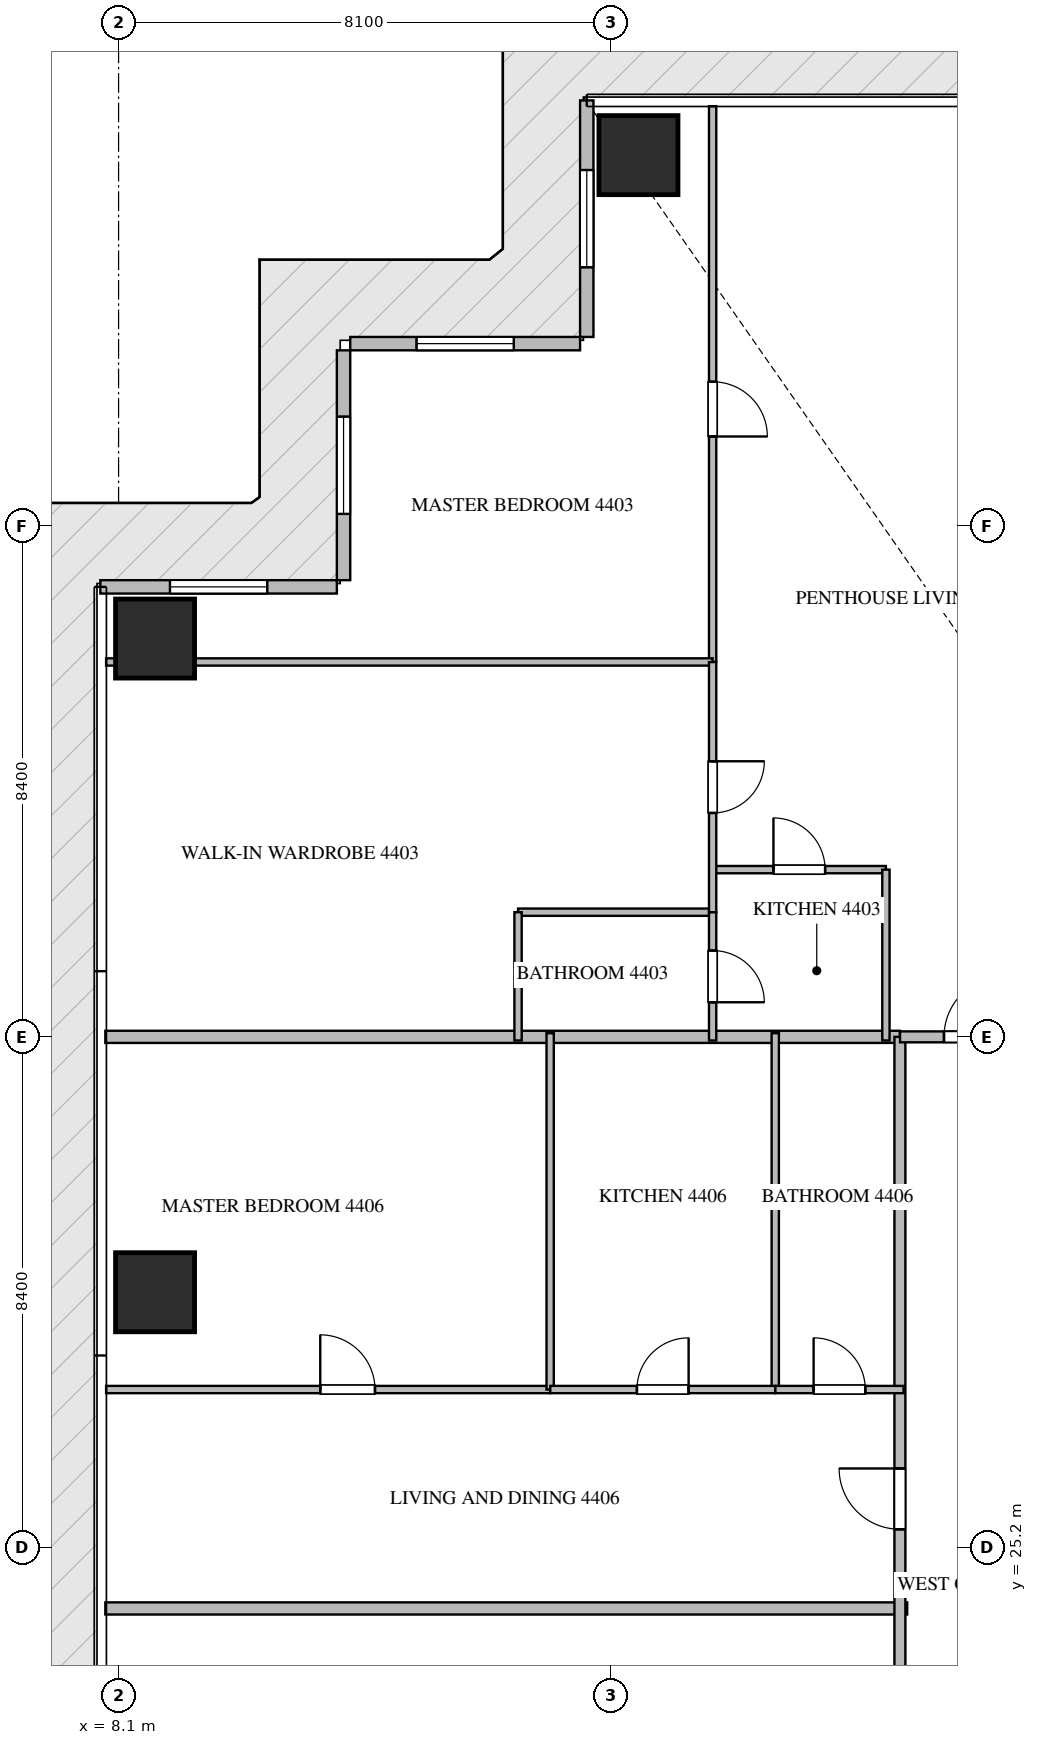
"""IFC4 building model, lengths in metres.
Left out: names, types, materials, properties, quantities, classifications, styles, units other than length and angle.
Written with IfcOpenShell. Run it as: python <this file> out.ifc"""

import sys

from ifc_helpers import new_model, si_unit, direction, frame, frame_2d, origin, origin_2d, place, context, subcontext, project, spatial, rectangle, extrude, source, transform, mapped, element, fill, save


model = new_model("IFC4")
c1 = context("Model", 3, precision=1e-05, world=origin(), true_north=direction((0.0, 1.0)))
c2 = subcontext(c1, "Body", "Model", "MODEL_VIEW")
j1 = project(units=[si_unit("LENGTHUNIT", "METRE"), si_unit("PLANEANGLEUNIT", "RADIAN")], contexts=[c1])
p1 = place(None, origin())
s1 = spatial("IfcSite", under=j1, at=p1, CompositionType="ELEMENT")
p2 = place(p1, origin())
s2 = spatial("IfcBuilding", under=s1, at=p2, CompositionType="ELEMENT")
p3 = place(p2, frame((0.0, 0.0, 176.4)))
s3 = spatial("IfcBuildingStorey", under=s2, at=p3, CompositionType="ELEMENT", Elevation=176.4)
m1 = source(origin(), c2, "Body", "SweptSolid", [
    extrude(rectangle(XDim=1.3, YDim=1.3, at=origin_2d()), origin(), (0.0, 0.0, 1.0), 3.75),
])
for number, where, z_axis, x_axis in (
    (1, (16.65, 48.1, -0.26), (0.0, 0.0, 1.0), (1.0, 0.0, 0.0)),
    (2, (8.7, 29.4, -0.26), (0.0, 0.0, 1.0), (1.0, 0.0, 0.0)),
    (3, (8.7, 40.15, -0.26), (0.0, 0.0, 1.0), (1.0, 0.0, 0.0)),
):
    element("IfcColumn", number, at=place(p3, frame(where, z_axis=z_axis, x_axis=x_axis)), inside=s3, PredefinedType="COLUMN", context=c2, shape_type="MappedRepresentation", body=[
        mapped(m1, transform((0.0, 0.0, 0.0), scale=1.0)),
    ])
p4 = place(p3, frame((15.8, 49.0, 0.0), z_axis=(0.0, 0.0, 1.0), x_axis=(0.0, -1.0, 0.0)))
e4 = element("IfcWall", 4, at=p4, inside=s3, PredefinedType="ELEMENTEDWALL", context=c2, shape_type="SweptSolid", body=[
    extrude(rectangle(XDim=3.89, YDim=0.22, at=frame_2d((1.945, 0.0))), origin(), (0.0, 0.0, 1.0), 3.475),
])
p5 = place(p4, frame((1.145, 0.0, 0.65)))
e5 = element("IfcOpeningElement", 5, at=p5, cuts=e4, PredefinedType="OPENING", context=c2, shape_type="SweptSolid", body=[
    extrude(rectangle(XDim=1.6, YDim=2.1, at=frame_2d((0.8, 1.05))), frame((0.0, 0.12, 0.0), z_axis=(0.0, -1.0, 0.0), x_axis=(1.0, 0.0, 0.0)), (0.0, 0.0, 1.0), 0.24),
])
p6 = place(p3, frame((15.69, 45.0, 0.0), z_axis=(0.0, 0.0, 1.0), x_axis=(-1.0, 0.0, 0.0)))
e6 = element("IfcWall", 6, at=p6, inside=s3, PredefinedType="ELEMENTEDWALL", context=c2, shape_type="SweptSolid", body=[
    extrude(rectangle(XDim=3.78, YDim=0.22, at=frame_2d((1.89, 0.0))), origin(), (0.0, 0.0, 1.0), 3.475),
])
p7 = place(p6, frame((1.09, 0.0, 0.65)))
e7 = element("IfcOpeningElement", 7, at=p7, cuts=e6, PredefinedType="OPENING", context=c2, shape_type="SweptSolid", body=[
    extrude(rectangle(XDim=1.6, YDim=2.1, at=frame_2d((0.8, 1.05))), frame((0.0, 0.12, 0.0), z_axis=(0.0, -1.0, 0.0), x_axis=(1.0, 0.0, 0.0)), (0.0, 0.0, 1.0), 0.24),
])
p8 = place(p3, frame((11.8, 44.89, 0.0), z_axis=(0.0, 0.0, 1.0), x_axis=(0.0, -1.0, 0.0)))
e8 = element("IfcWall", 8, at=p8, inside=s3, PredefinedType="ELEMENTEDWALL", context=c2, shape_type="SweptSolid", body=[
    extrude(rectangle(XDim=3.78, YDim=0.22, at=frame_2d((1.89, 0.0))), origin(), (0.0, 0.0, 1.0), 3.475),
])
p9 = place(p8, frame((1.09, 0.0, 0.65)))
e9 = element("IfcOpeningElement", 9, at=p9, cuts=e8, PredefinedType="OPENING", context=c2, shape_type="SweptSolid", body=[
    extrude(rectangle(XDim=1.6, YDim=2.1, at=frame_2d((0.8, 1.05))), frame((0.0, 0.12, 0.0), z_axis=(0.0, -1.0, 0.0), x_axis=(1.0, 0.0, 0.0)), (0.0, 0.0, 1.0), 0.24),
])
p10 = place(p3, frame((11.69, 41.0, 0.0), z_axis=(0.0, 0.0, 1.0), x_axis=(-1.0, 0.0, 0.0)))
e10 = element("IfcWall", 10, at=p10, inside=s3, PredefinedType="ELEMENTEDWALL", context=c2, shape_type="SweptSolid", body=[
    extrude(rectangle(XDim=3.89, YDim=0.22, at=frame_2d((1.945, 0.0))), origin(), (0.0, 0.0, 1.0), 3.475),
])
p11 = place(p10, frame((1.145, 0.0, 0.65)))
e11 = element("IfcOpeningElement", 11, at=p11, cuts=e10, PredefinedType="OPENING", context=c2, shape_type="SweptSolid", body=[
    extrude(rectangle(XDim=1.6, YDim=2.1, at=frame_2d((0.8, 1.05))), frame((0.0, 0.12, 0.0), z_axis=(0.0, -1.0, 0.0), x_axis=(1.0, 0.0, 0.0)), (0.0, 0.0, 1.0), 0.24),
])
p12 = place(p3, frame((7.882, 24.2, 0.0), z_axis=(0.0, 0.0, 1.0), x_axis=(1.0, 0.0, 0.0)))
e12 = element("IfcWall", 12, at=p12, inside=s3, PredefinedType="PARTITIONING", context=c2, shape_type="SweptSolid", body=[
    extrude(rectangle(XDim=13.188, YDim=0.2, at=frame_2d((6.594, 0.0))), origin(), (0.0, 0.0, 1.0), 3.49),
])
p13 = place(p3, frame((7.882, 33.6, 0.0), z_axis=(0.0, 0.0, 1.0), x_axis=(1.0, 0.0, 0.0)))
e13 = element("IfcWall", 13, at=p13, inside=s3, PredefinedType="PARTITIONING", context=c2, shape_type="SweptSolid", body=[
    extrude(rectangle(XDim=13.068, YDim=0.2, at=frame_2d((6.534, 0.0))), origin(), (0.0, 0.0, 1.0), 3.49),
])
p14 = place(p3, frame((20.95, 14.9, 0.0), z_axis=(0.0, 0.0, 1.0), x_axis=(0.0, 1.0, 0.0)))
e14 = element("IfcWall", 14, at=p14, inside=s3, PredefinedType="PARTITIONING", context=c2, shape_type="SweptSolid", body=[
    extrude(rectangle(XDim=18.7, YDim=0.18, at=frame_2d((9.35, 0.0))), origin(), (0.0, 0.0, 1.0), 3.49),
])
p15 = place(p14, frame((5.522, 0.0, 0.0)))
e15 = element("IfcOpeningElement", 15, at=p15, cuts=e14, PredefinedType="OPENING", context=c2, shape_type="SweptSolid", body=[
    extrude(rectangle(XDim=1.0, YDim=2.15, at=frame_2d((0.5, 1.075))), frame((0.0, 0.1, 0.0), z_axis=(0.0, -1.0, 0.0), x_axis=(1.0, 0.0, 0.0)), (0.0, 0.0, 1.0), 0.2),
])
p16 = place(p14, frame((10.602, 0.0, 0.0)))
e16 = element("IfcOpeningElement", 16, at=p16, cuts=e14, PredefinedType="OPENING", context=c2, shape_type="SweptSolid", body=[
    extrude(rectangle(XDim=1.0, YDim=2.15, at=frame_2d((0.5, 1.075))), frame((0.0, 0.1, 0.0), z_axis=(0.0, -1.0, 0.0), x_axis=(1.0, 0.0, 0.0)), (0.0, 0.0, 1.0), 0.2),
])
p17 = place(p3, frame((20.952, 33.6, 0.0), z_axis=(0.0, 0.0, 1.0), x_axis=(1.0, 0.0, 0.0)))
e17 = element("IfcWall", 17, at=p17, inside=s3, PredefinedType="PARTITIONING", context=c2, shape_type="SweptSolid", body=[
    extrude(rectangle(XDim=2.446, YDim=0.18, at=frame_2d((1.223, 0.0))), origin(), (0.0, 0.0, 1.0), 3.49),
])
p18 = place(p17, frame((0.723, 0.0, 0.0)))
e18 = element("IfcOpeningElement", 18, at=p18, cuts=e17, PredefinedType="OPENING", context=c2, shape_type="SweptSolid", body=[
    extrude(rectangle(XDim=1.0, YDim=2.15, at=frame_2d((0.5, 1.075))), frame((0.0, 0.1, 0.0), z_axis=(0.0, -1.0, 0.0), x_axis=(1.0, 0.0, 0.0)), (0.0, 0.0, 1.0), 0.2),
])
p19 = place(p3, frame((17.87, 36.35, 0.0), z_axis=(0.0, 0.0, 1.0), x_axis=(1.0, 0.0, 0.0)))
e19 = element("IfcWall", 19, at=p19, inside=s3, PredefinedType="PARTITIONING", context=c2, shape_type="SweptSolid", body=[
    extrude(rectangle(XDim=2.85, YDim=0.12, at=frame_2d((1.425, 0.0))), origin(), (0.0, 0.0, 1.0), 3.49),
])
p20 = place(p19, frame((1.0, 0.0, 0.0)))
e20 = element("IfcOpeningElement", 20, at=p20, cuts=e19, PredefinedType="OPENING", context=c2, shape_type="SweptSolid", body=[
    extrude(rectangle(XDim=0.85, YDim=2.1, at=frame_2d((0.425, 1.05))), frame((0.0, 0.07, 0.0), z_axis=(0.0, -1.0, 0.0), x_axis=(1.0, 0.0, 0.0)), (0.0, 0.0, 1.0), 0.14),
])
p21 = place(p3, frame((20.72, 36.35, 0.0), z_axis=(0.0, 0.0, 1.0), x_axis=(0.0, -1.0, 0.0)))
e21 = element("IfcWall", 21, at=p21, inside=s3, PredefinedType="PARTITIONING", context=c2, shape_type="SweptSolid", body=[
    extrude(rectangle(XDim=2.81, YDim=0.12, at=frame_2d((1.405, 0.0))), origin(), (0.0, 0.0, 1.0), 3.49),
])
p22 = place(p3, frame((17.87, 48.905, 0.0), z_axis=(0.0, 0.0, 1.0), x_axis=(0.0, -1.0, 0.0)))
e22 = element("IfcWall", 22, at=p22, inside=s3, PredefinedType="PARTITIONING", context=c2, shape_type="SweptSolid", body=[
    extrude(rectangle(XDim=9.14, YDim=0.12, at=frame_2d((4.57, 0.0))), origin(), (0.0, 0.0, 1.0), 3.49),
])
p23 = place(p22, frame((4.532, 0.0, 0.0)))
e23 = element("IfcOpeningElement", 23, at=p23, cuts=e22, PredefinedType="OPENING", context=c2, shape_type="SweptSolid", body=[
    extrude(rectangle(XDim=0.9, YDim=2.1, at=frame_2d((0.45, 1.05))), frame((0.0, 0.07, 0.0), z_axis=(0.0, -1.0, 0.0), x_axis=(1.0, 0.0, 0.0)), (0.0, 0.0, 1.0), 0.14),
])
p24 = place(p3, frame((7.895, 39.765, 0.0), z_axis=(0.0, 0.0, 1.0), x_axis=(1.0, 0.0, 0.0)))
e24 = element("IfcWall", 24, at=p24, inside=s3, PredefinedType="PARTITIONING", context=c2, shape_type="SweptSolid", body=[
    extrude(rectangle(XDim=9.975, YDim=0.12, at=frame_2d((4.988, 0.0))), origin(), (0.0, 0.0, 1.0), 3.49),
])
p25 = place(p3, frame((14.67, 35.65, 0.0), z_axis=(0.0, 0.0, 1.0), x_axis=(1.0, 0.0, 0.0)))
e25 = element("IfcWall", 25, at=p25, inside=s3, PredefinedType="PARTITIONING", context=c2, shape_type="SweptSolid", body=[
    extrude(rectangle(XDim=3.2, YDim=0.12, at=frame_2d((1.6, 0.0))), origin(), (0.0, 0.0, 1.0), 3.49),
])
p26 = place(p3, frame((14.67, 35.65, 0.0), z_axis=(0.0, 0.0, 1.0), x_axis=(0.0, -1.0, 0.0)))
e26 = element("IfcWall", 26, at=p26, inside=s3, PredefinedType="PARTITIONING", context=c2, shape_type="SweptSolid", body=[
    extrude(rectangle(XDim=2.11, YDim=0.12, at=frame_2d((1.055, 0.0))), origin(), (0.0, 0.0, 1.0), 3.49),
])
p27 = place(p3, frame((17.87, 39.763, 0.0), z_axis=(0.0, 0.0, 1.0), x_axis=(0.0, -1.0, 0.0)))
e27 = element("IfcWall", 27, at=p27, inside=s3, PredefinedType="PARTITIONING", context=c2, shape_type="SweptSolid", body=[
    extrude(rectangle(XDim=4.113, YDim=0.12, at=frame_2d((2.057, 0.0))), origin(), (0.0, 0.0, 1.0), 3.49),
])
p28 = place(p27, frame((1.631, 0.0, 0.0)))
e28 = element("IfcOpeningElement", 28, at=p28, cuts=e27, PredefinedType="OPENING", context=c2, shape_type="SweptSolid", body=[
    extrude(rectangle(XDim=0.85, YDim=2.1, at=frame_2d((0.425, 1.05))), frame((0.0, 0.07, 0.0), z_axis=(0.0, -1.0, 0.0), x_axis=(1.0, 0.0, 0.0)), (0.0, 0.0, 1.0), 0.14),
])
p29 = place(p3, frame((17.87, 35.648, 0.0), z_axis=(0.0, 0.0, 1.0), x_axis=(0.0, -1.0, 0.0)))
e29 = element("IfcWall", 29, at=p29, inside=s3, PredefinedType="PARTITIONING", context=c2, shape_type="SweptSolid", body=[
    extrude(rectangle(XDim=2.108, YDim=0.12, at=frame_2d((1.054, 0.0))), origin(), (0.0, 0.0, 1.0), 3.49),
])
p30 = place(p29, frame((0.629, 0.0, 0.0)))
e30 = element("IfcOpeningElement", 30, at=p30, cuts=e29, PredefinedType="OPENING", context=c2, shape_type="SweptSolid", body=[
    extrude(rectangle(XDim=0.85, YDim=2.1, at=frame_2d((0.425, 1.05))), frame((0.0, 0.07, 0.0), z_axis=(0.0, -1.0, 0.0), x_axis=(1.0, 0.0, 0.0)), (0.0, 0.0, 1.0), 0.14),
])
p31 = place(p3, frame((7.895, 27.8, 0.0), z_axis=(0.0, 0.0, 1.0), x_axis=(1.0, 0.0, 0.0)))
e31 = element("IfcWall", 31, at=p31, inside=s3, PredefinedType="PARTITIONING", context=c2, shape_type="SweptSolid", body=[
    extrude(rectangle(XDim=7.303, YDim=0.12, at=frame_2d((3.651, 0.0))), origin(), (0.0, 0.0, 1.0), 3.49),
])
p32 = place(p31, frame((3.522, 0.0, 0.0)))
e32 = element("IfcOpeningElement", 32, at=p32, cuts=e31, PredefinedType="OPENING", context=c2, shape_type="SweptSolid", body=[
    extrude(rectangle(XDim=0.9, YDim=2.1, at=frame_2d((0.45, 1.05))), frame((0.0, 0.07, 0.0), z_axis=(0.0, -1.0, 0.0), x_axis=(1.0, 0.0, 0.0)), (0.0, 0.0, 1.0), 0.14),
])
for number, where, z_axis, x_axis in (
    (33, (15.198, 27.8, 0.0), (0.0, 0.0, 1.0), (0.0, 1.0, 0.0)),
    (34, (18.9, 27.8, 0.0), (0.0, 0.0, 1.0), (0.0, 1.0, 0.0)),
):
    element("IfcWall", number, at=place(p3, frame(where, z_axis=z_axis, x_axis=x_axis)), inside=s3, PredefinedType="PARTITIONING", context=c2, shape_type="SweptSolid", body=[
        extrude(rectangle(XDim=5.86, YDim=0.12, at=frame_2d((2.93, 0.0))), origin(), (0.0, 0.0, 1.0), 3.49),
    ])
p33 = place(p3, frame((15.2, 27.8, 0.0), z_axis=(0.0, 0.0, 1.0), x_axis=(1.0, 0.0, 0.0)))
e35 = element("IfcWall", 35, at=p33, inside=s3, PredefinedType="PARTITIONING", context=c2, shape_type="SweptSolid", body=[
    extrude(rectangle(XDim=3.7, YDim=0.12, at=frame_2d((1.85, 0.0))), origin(), (0.0, 0.0, 1.0), 3.49),
])
p34 = place(p33, frame((1.425, 0.0, 0.0)))
e36 = element("IfcOpeningElement", 36, at=p34, cuts=e35, PredefinedType="OPENING", context=c2, shape_type="SweptSolid", body=[
    extrude(rectangle(XDim=0.85, YDim=2.1, at=frame_2d((0.425, 1.05))), frame((0.0, 0.07, 0.0), z_axis=(0.0, -1.0, 0.0), x_axis=(1.0, 0.0, 0.0)), (0.0, 0.0, 1.0), 0.14),
])
p35 = place(p3, frame((18.902, 27.8, 0.0), z_axis=(0.0, 0.0, 1.0), x_axis=(1.0, 0.0, 0.0)))
e37 = element("IfcWall", 37, at=p35, inside=s3, PredefinedType="PARTITIONING", context=c2, shape_type="SweptSolid", body=[
    extrude(rectangle(XDim=2.108, YDim=0.12, at=frame_2d((1.054, 0.0))), origin(), (0.0, 0.0, 1.0), 3.49),
])
p36 = place(p35, frame((0.629, 0.0, 0.0)))
e38 = element("IfcOpeningElement", 38, at=p36, cuts=e37, PredefinedType="OPENING", context=c2, shape_type="SweptSolid", body=[
    extrude(rectangle(XDim=0.85, YDim=2.1, at=frame_2d((0.425, 1.05))), frame((0.0, 0.07, 0.0), z_axis=(0.0, -1.0, 0.0), x_axis=(1.0, 0.0, 0.0)), (0.0, 0.0, 1.0), 0.14),
])
m2 = source(origin(), c2, "Body", "SweptSolid", [
    extrude(rectangle(XDim=1.6, YDim=2.1, at=frame_2d((0.8, 1.05))), frame((0.0, 0.03, 0.0), z_axis=(0.0, -1.0, 0.0), x_axis=(1.0, 0.0, 0.0)), (0.0, 0.0, 1.0), 0.06),
])
p37 = place(p5, origin())
e39 = element("IfcWindow", 39, at=p37, inside=s3, PartitioningType="SINGLE_PANEL", PredefinedType="WINDOW", context=c2, shape_type="MappedRepresentation", body=[
    mapped(m2, transform((0.0, 0.0, 0.0), scale=1.0)),
])
fill(e5, e39)
p38 = place(p7, origin())
e40 = element("IfcWindow", 40, at=p38, inside=s3, PartitioningType="SINGLE_PANEL", PredefinedType="WINDOW", context=c2, shape_type="MappedRepresentation", body=[
    mapped(m2, transform((0.0, 0.0, 0.0), scale=1.0)),
])
fill(e7, e40)
p39 = place(p9, origin())
e41 = element("IfcWindow", 41, at=p39, inside=s3, PartitioningType="SINGLE_PANEL", PredefinedType="WINDOW", context=c2, shape_type="MappedRepresentation", body=[
    mapped(m2, transform((0.0, 0.0, 0.0), scale=1.0)),
])
fill(e9, e41)
p40 = place(p11, origin())
e42 = element("IfcWindow", 42, at=p40, inside=s3, PartitioningType="SINGLE_PANEL", PredefinedType="WINDOW", context=c2, shape_type="MappedRepresentation", body=[
    mapped(m2, transform((0.0, 0.0, 0.0), scale=1.0)),
])
fill(e11, e42)
m3 = source(origin(), c2, "Body", "SweptSolid", [
    extrude(rectangle(XDim=1.0, YDim=2.15, at=frame_2d((0.5, 1.075))), frame((0.0, 0.025, 0.0), z_axis=(0.0, -1.0, 0.0), x_axis=(1.0, 0.0, 0.0)), (0.0, 0.0, 1.0), 0.05),
])
p41 = place(p16, origin())
e43 = element("IfcDoor", 43, at=p41, inside=s3, OperationType="SINGLE_SWING_RIGHT", PredefinedType="DOOR", context=c2, shape_type="MappedRepresentation", body=[
    mapped(m3, transform((0.0, 0.0, 0.0), scale=1.0)),
])
fill(e16, e43)
p42 = place(p18, origin())
e44 = element("IfcDoor", 44, at=p42, inside=s3, OperationType="SINGLE_SWING_RIGHT", PredefinedType="DOOR", context=c2, shape_type="MappedRepresentation", body=[
    mapped(m3, transform((0.0, 0.0, 0.0), scale=1.0)),
])
fill(e18, e44)
m4 = source(origin(), c2, "Body", "SweptSolid", [
    extrude(rectangle(XDim=0.85, YDim=2.1, at=frame_2d((0.425, 1.05))), frame((0.0, 0.025, 0.0), z_axis=(0.0, -1.0, 0.0), x_axis=(1.0, 0.0, 0.0)), (0.0, 0.0, 1.0), 0.05),
])
p43 = place(p20, origin())
e45 = element("IfcDoor", 45, at=p43, inside=s3, OperationType="SINGLE_SWING_LEFT", PredefinedType="DOOR", context=c2, shape_type="MappedRepresentation", body=[
    mapped(m4, transform((0.0, 0.0, 0.0), scale=1.0)),
])
fill(e20, e45)
m5 = source(origin(), c2, "Body", "SweptSolid", [
    extrude(rectangle(XDim=0.9, YDim=2.1, at=frame_2d((0.45, 1.05))), frame((0.0, 0.025, 0.0), z_axis=(0.0, -1.0, 0.0), x_axis=(1.0, 0.0, 0.0)), (0.0, 0.0, 1.0), 0.05),
])
p44 = place(p23, origin())
e46 = element("IfcDoor", 46, at=p44, inside=s3, OperationType="SINGLE_SWING_RIGHT", PredefinedType="DOOR", context=c2, shape_type="MappedRepresentation", body=[
    mapped(m5, transform((0.0, 0.0, 0.0), scale=1.0)),
])
fill(e23, e46)
p45 = place(p28, origin())
e47 = element("IfcDoor", 47, at=p45, inside=s3, OperationType="SINGLE_SWING_LEFT", PredefinedType="DOOR", context=c2, shape_type="MappedRepresentation", body=[
    mapped(m4, transform((0.0, 0.0, 0.0), scale=1.0)),
])
fill(e28, e47)
p46 = place(p30, origin())
e48 = element("IfcDoor", 48, at=p46, inside=s3, OperationType="SINGLE_SWING_RIGHT", PredefinedType="DOOR", context=c2, shape_type="MappedRepresentation", body=[
    mapped(m4, transform((0.0, 0.0, 0.0), scale=1.0)),
])
fill(e30, e48)
p47 = place(p32, origin())
e49 = element("IfcDoor", 49, at=p47, inside=s3, OperationType="SINGLE_SWING_LEFT", PredefinedType="DOOR", context=c2, shape_type="MappedRepresentation", body=[
    mapped(m5, transform((0.0, 0.0, 0.0), scale=1.0)),
])
fill(e32, e49)
p48 = place(p34, origin())
e50 = element("IfcDoor", 50, at=p48, inside=s3, OperationType="SINGLE_SWING_RIGHT", PredefinedType="DOOR", context=c2, shape_type="MappedRepresentation", body=[
    mapped(m4, transform((0.0, 0.0, 0.0), scale=1.0)),
])
fill(e36, e50)
p49 = place(p36, origin())
e51 = element("IfcDoor", 51, at=p49, inside=s3, OperationType="SINGLE_SWING_LEFT", PredefinedType="DOOR", context=c2, shape_type="MappedRepresentation", body=[
    mapped(m4, transform((0.0, 0.0, 0.0), scale=1.0)),
])
fill(e38, e51)
save(model, sys.argv[1])
